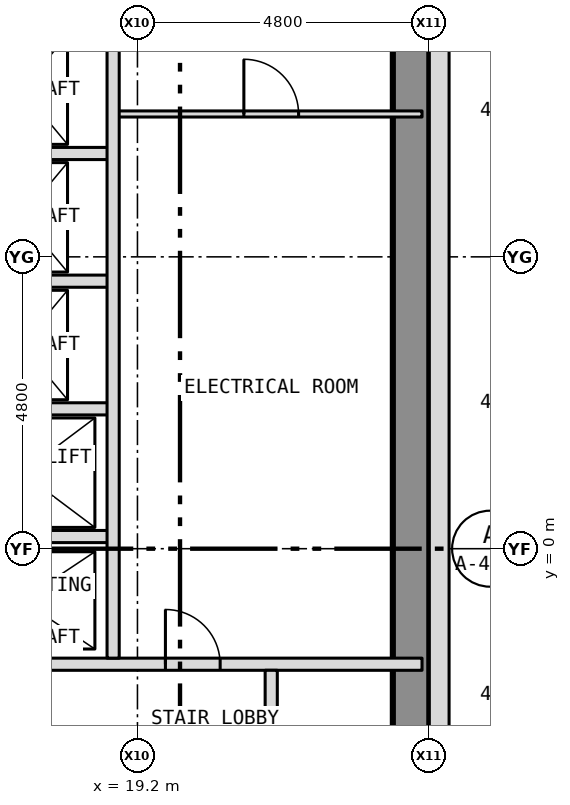
"""IFC4 building model, lengths in metres.
Left out: names, types, materials, properties, quantities, classifications, styles, units other than length and angle.
Written with IfcOpenShell. Run it as: python <this file> out.ifc"""

import sys

from ifc_helpers import new_model, si_unit, direction, frame, frame_2d, origin, place, context, subcontext, project, spatial, rectangle, extrude, element, fill, save


model = new_model("IFC4")
c1 = context("Model", 3, precision=1e-05, world=origin(), true_north=direction((0.0, 1.0)))
c2 = subcontext(c1, "Body", "Model", "MODEL_VIEW")
j1 = project(units=[si_unit("LENGTHUNIT", "METRE"), si_unit("PLANEANGLEUNIT", "RADIAN")], contexts=[c1])
p1 = place(None, origin())
s1 = spatial("IfcSite", under=j1, at=p1, CompositionType="ELEMENT")
p2 = place(p1, origin())
s2 = spatial("IfcBuilding", under=s1, at=p2, CompositionType="ELEMENT")
p3 = place(p2, frame((0.0, 0.0, 77.5)))
s3 = spatial("IfcBuildingStorey", under=s2, at=p3, CompositionType="ELEMENT", Elevation=77.5)
p4 = place(p3, frame((23.7, -10.8, 0.0), z_axis=(0.0, 0.0, 1.0), x_axis=(0.0, 1.0, 0.0)))
e1 = element("IfcWall", 1, at=p4, inside=s3, PredefinedType="SHEAR", context=c2, shape_type="SweptSolid", body=[
    extrude(rectangle(XDim=21.6, YDim=0.6, at=frame_2d((10.8, 0.0))), origin(), (0.0, 0.0, 1.0), 3.25),
])
p5 = place(p3, frame((24.163, -10.8, 0.0), z_axis=(0.0, 0.0, 1.0), x_axis=(0.0, 1.0, 0.0)))
e2 = element("IfcWall", 2, at=p5, inside=s3, PredefinedType="SOLIDWALL", context=c2, shape_type="SweptSolid", body=[
    extrude(rectangle(XDim=21.6, YDim=0.325, at=frame_2d((10.8, 0.0))), origin(), (0.0, 0.0, 1.0), 3.5),
])
p6 = place(p5, frame((2.95, 0.0, 1.0)))
e3 = element("IfcOpeningElement", 3, at=p6, cuts=e2, PredefinedType="OPENING", context=c2, shape_type="SweptSolid", body=[
    extrude(rectangle(XDim=0.6, YDim=1.5, at=frame_2d((0.3, 0.75))), frame((0.0, 0.175, 0.0), z_axis=(0.0, -1.0, 0.0), x_axis=(1.0, 0.0, 0.0)), (0.0, 0.0, 1.0), 0.349),
])
p7 = place(p3, frame((15.92, -1.9, 0.0), z_axis=(0.0, 0.0, 1.0), x_axis=(1.0, 0.0, 0.0)))
e4 = element("IfcWall", 4, at=p7, inside=s3, PredefinedType="PARTITIONING", context=c2, shape_type="SweptSolid", body=[
    extrude(rectangle(XDim=7.96, YDim=0.2, at=frame_2d((3.98, 0.0))), origin(), (0.0, 0.0, 1.0), 3.25),
])
p8 = place(p7, frame((3.74, 0.0, 0.0)))
e5 = element("IfcOpeningElement", 5, at=p8, cuts=e4, PredefinedType="OPENING", context=c2, shape_type="SweptSolid", body=[
    extrude(rectangle(XDim=0.9, YDim=2.1, at=frame_2d((0.45, 1.05))), frame((0.0, 0.112, 0.0), z_axis=(0.0, -1.0, 0.0), x_axis=(1.0, 0.0, 0.0)), (0.0, 0.0, 1.0), 0.224),
])
for number, where, z_axis, x_axis in (
    (6, (15.92, 0.2, 0.0), (0.0, 0.0, 1.0), (1.0, 0.0, 0.0)),
    (7, (15.92, 2.3, 0.0), (0.0, 0.0, 1.0), (1.0, 0.0, 0.0)),
    (8, (15.92, 4.4, 0.0), (0.0, 0.0, 1.0), (1.0, 0.0, 0.0)),
    (9, (15.92, 6.5, 0.0), (0.0, 0.0, 1.0), (1.0, 0.0, 0.0)),
):
    element("IfcWall", number, at=place(p3, frame(where, z_axis=z_axis, x_axis=x_axis)), inside=s3, PredefinedType="PARTITIONING", context=c2, shape_type="SweptSolid", body=[
        extrude(rectangle(XDim=2.88, YDim=0.2, at=frame_2d((1.44, 0.0))), origin(), (0.0, 0.0, 1.0), 3.25),
    ])
p9 = place(p3, frame((18.8, 7.15, 0.0), z_axis=(0.0, 0.0, 1.0), x_axis=(1.0, 0.0, 0.0)))
e10 = element("IfcWall", 10, at=p9, inside=s3, PredefinedType="PARTITIONING", context=c2, shape_type="SweptSolid", body=[
    extrude(rectangle(XDim=5.08, YDim=0.1, at=frame_2d((2.54, 0.0))), origin(), (0.0, 0.0, 1.0), 3.25),
])
p10 = place(p9, frame((2.15, 0.0, 0.0)))
e11 = element("IfcOpeningElement", 11, at=p10, cuts=e10, PredefinedType="OPENING", context=c2, shape_type="SweptSolid", body=[
    extrude(rectangle(XDim=0.9, YDim=2.1, at=frame_2d((0.45, 1.05))), frame((0.0, 0.062, 0.0), z_axis=(0.0, -1.0, 0.0), x_axis=(1.0, 0.0, 0.0)), (0.0, 0.0, 1.0), 0.124),
])
p11 = place(p3, frame((18.8, -1.8, 0.0), z_axis=(0.0, 0.0, 1.0), x_axis=(0.0, 1.0, 0.0)))
e12 = element("IfcWall", 12, at=p11, inside=s3, PredefinedType="PARTITIONING", context=c2, shape_type="SweptSolid", body=[
    extrude(rectangle(XDim=12.48, YDim=0.2, at=frame_2d((6.24, 0.0))), origin(), (0.0, 0.0, 1.0), 3.25),
])
p12 = place(p3, frame((21.4, -10.68, 0.0), z_axis=(0.0, 0.0, 1.0), x_axis=(0.0, 1.0, 0.0)))
e13 = element("IfcWall", 13, at=p12, inside=s3, PredefinedType="PARTITIONING", context=c2, shape_type="SweptSolid", body=[
    extrude(rectangle(XDim=8.68, YDim=0.2, at=frame_2d((4.34, 0.0))), origin(), (0.0, 0.0, 1.0), 3.25),
])
p13 = place(p12, frame((1.21, 0.0, 0.0)))
e14 = element("IfcOpeningElement", 14, at=p13, cuts=e13, PredefinedType="OPENING", context=c2, shape_type="SweptSolid", body=[
    extrude(rectangle(XDim=0.9, YDim=2.1, at=frame_2d((0.45, 1.05))), frame((0.0, 0.112, 0.0), z_axis=(0.0, -1.0, 0.0), x_axis=(1.0, 0.0, 0.0)), (0.0, 0.0, 1.0), 0.224),
])
p14 = place(p12, frame((5.66, 0.0, 0.0)))
e15 = element("IfcOpeningElement", 15, at=p14, cuts=e13, PredefinedType="OPENING", context=c2, shape_type="SweptSolid", body=[
    extrude(rectangle(XDim=0.9, YDim=2.1, at=frame_2d((0.45, 1.05))), frame((0.0, 0.112, 0.0), z_axis=(0.0, -1.0, 0.0), x_axis=(1.0, 0.0, 0.0)), (0.0, 0.0, 1.0), 0.224),
])
p15 = place(p8, origin())
e16 = element("IfcDoor", 16, at=p15, inside=s3, OperationType="SINGLE_SWING_LEFT", PredefinedType="DOOR", context=c2, shape_type="SweptSolid", body=[
    extrude(rectangle(XDim=0.9, YDim=2.1, at=frame_2d((0.45, 1.05))), frame((0.0, 0.025, 0.0), z_axis=(0.0, -1.0, 0.0), x_axis=(1.0, 0.0, 0.0)), (0.0, 0.0, 1.0), 0.05),
])
fill(e5, e16)
p16 = place(p10, origin())
e17 = element("IfcDoor", 17, at=p16, inside=s3, OperationType="SINGLE_SWING_LEFT", PredefinedType="DOOR", context=c2, shape_type="SweptSolid", body=[
    extrude(rectangle(XDim=0.9, YDim=2.1, at=frame_2d((0.45, 1.05))), frame((0.0, 0.025, 0.0), z_axis=(0.0, -1.0, 0.0), x_axis=(1.0, 0.0, 0.0)), (0.0, 0.0, 1.0), 0.05),
])
fill(e11, e17)
save(model, sys.argv[1])
